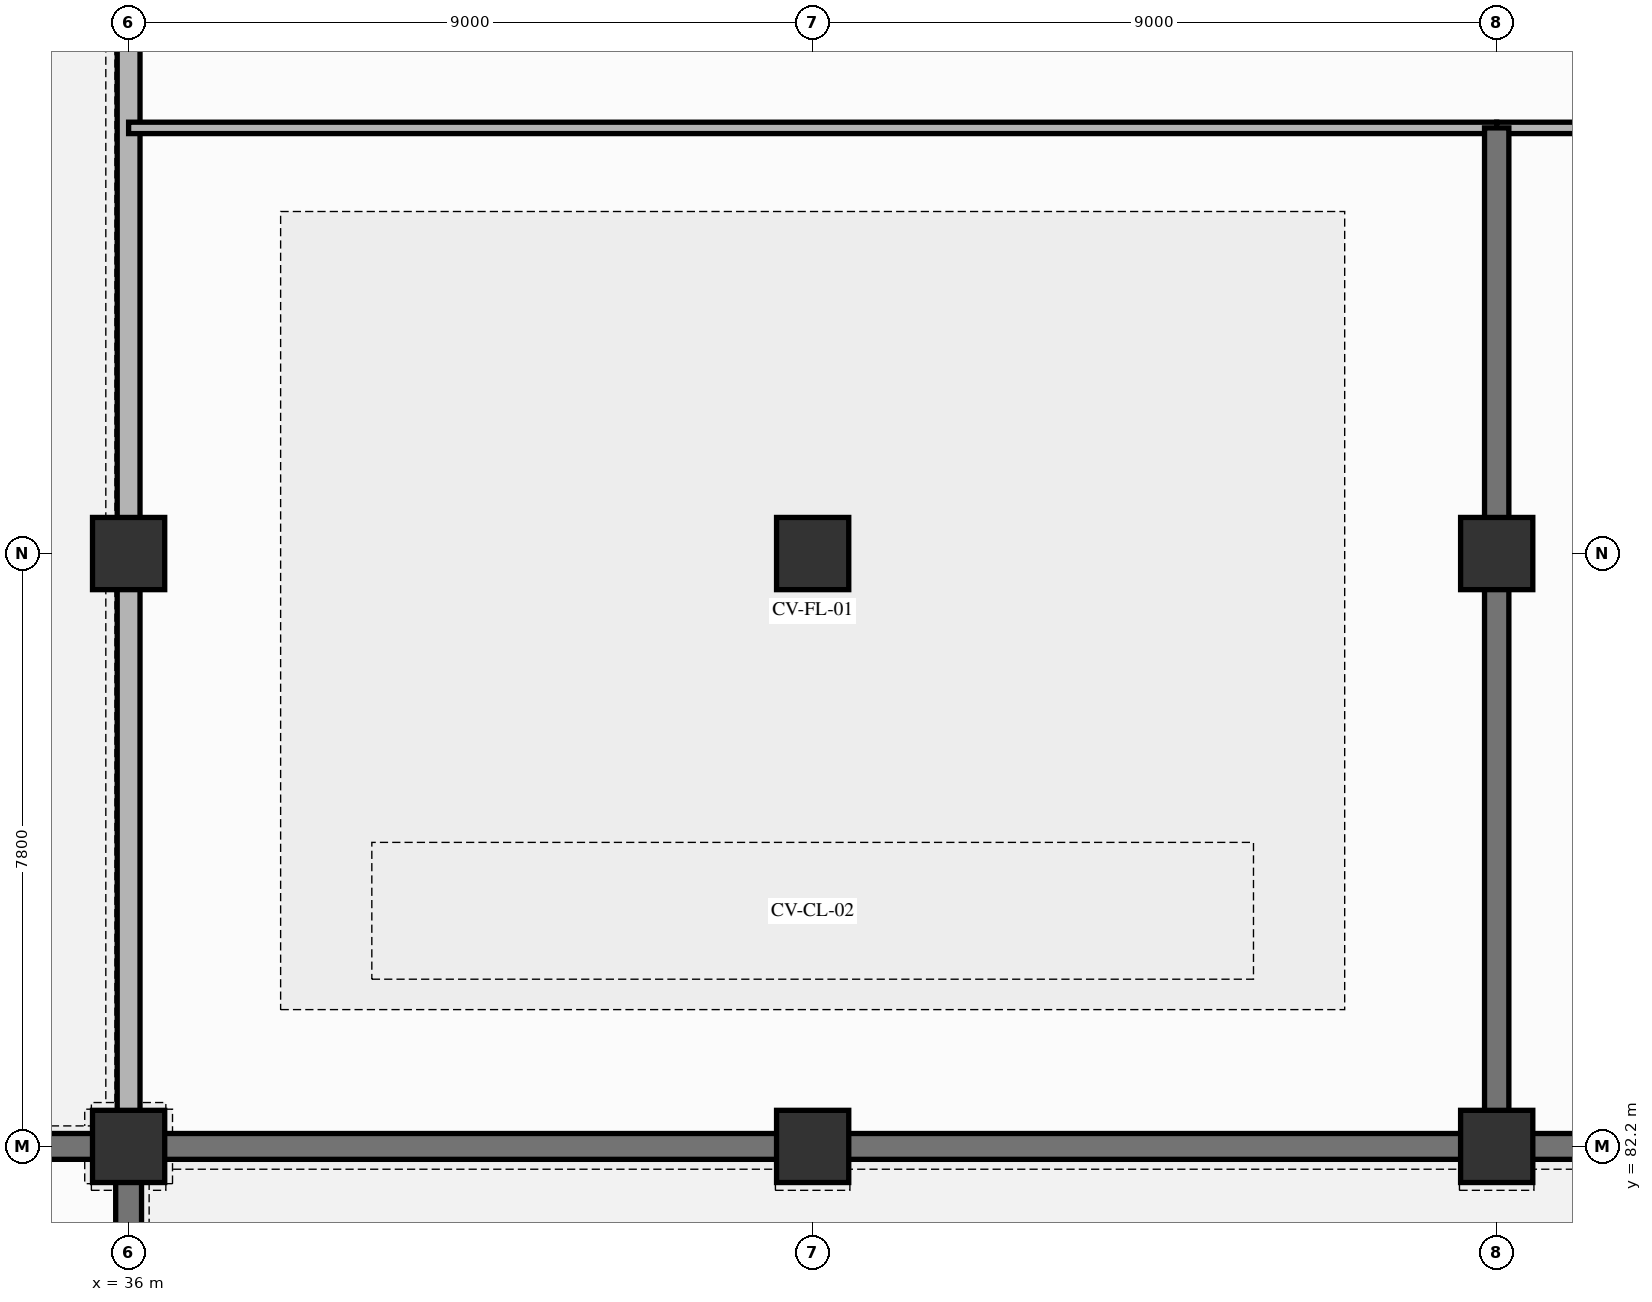
"""IFC4 building model, lengths in metres.
Left out: names, types, materials, properties, quantities, classifications, styles, units other than length and angle.
Written with IfcOpenShell. Run it as: python <this file> out.ifc"""

import sys

from ifc_helpers import new_model, si_unit, direction, frame, frame_2d, origin, origin_2d, place, context, subcontext, project, spatial, rectangle, extrude, element, fill, save


model = new_model("IFC4")
c1 = context("Model", 3, precision=1e-05, world=origin(), true_north=direction((0.0, 1.0)))
c2 = subcontext(c1, "Body", "Model", "MODEL_VIEW")
j1 = project(units=[si_unit("LENGTHUNIT", "METRE"), si_unit("PLANEANGLEUNIT", "RADIAN")], contexts=[c1])
p1 = place(None, origin())
s1 = spatial("IfcSite", under=j1, at=p1, CompositionType="ELEMENT")
p2 = place(p1, origin())
s2 = spatial("IfcBuilding", under=s1, at=p2, CompositionType="ELEMENT")
p3 = place(p2, origin())
s3 = spatial("IfcBuildingStorey", under=s2, at=p3, CompositionType="ELEMENT", Elevation=0.0)
for number, where, z_axis, x_axis in (
    (1, (36.0, 82.2, 0.0), (0.0, 0.0, 1.0), (1.0, 0.0, 0.0)),
    (2, (36.0, 90.0, 0.0), (0.0, 0.0, 1.0), (1.0, 0.0, 0.0)),
    (3, (45.0, 82.2, 0.0), (0.0, 0.0, 1.0), (1.0, 0.0, 0.0)),
    (4, (45.0, 90.0, 0.0), (0.0, 0.0, 1.0), (1.0, 0.0, 0.0)),
    (5, (54.0, 82.2, 0.0), (0.0, 0.0, 1.0), (1.0, 0.0, 0.0)),
    (6, (54.0, 90.0, 0.0), (0.0, 0.0, 1.0), (1.0, 0.0, 0.0)),
):
    element("IfcColumn", number, at=place(p3, frame(where, z_axis=z_axis, x_axis=x_axis)), inside=s3, PredefinedType="COLUMN", context=c2, shape_type="SweptSolid", body=[
        extrude(rectangle(XDim=0.95, YDim=0.95, at=origin_2d()), origin(), (0.0, 0.0, 1.0), 5.1),
    ])
p4 = place(p3, frame((36.0, 82.2, 0.0), z_axis=(0.0, 0.0, 1.0), x_axis=(1.0, 0.0, 0.0)))
e7 = element("IfcWall", 7, at=p4, inside=s3, PredefinedType="SOLIDWALL", context=c2, shape_type="SweptSolid", body=[
    extrude(rectangle(XDim=9.0, YDim=0.34, at=frame_2d((4.5, 0.0))), origin(), (0.0, 0.0, 1.0), 4.8),
])
p5 = place(p4, frame((1.8, 0.0, 0.85)))
e8 = element("IfcOpeningElement", 8, at=p5, cuts=e7, PredefinedType="OPENING", context=c2, shape_type="SweptSolid", body=[
    extrude(rectangle(XDim=1.5, YDim=2.1, at=frame_2d((0.75, 1.05))), frame((0.0, 0.18, 0.0), z_axis=(0.0, -1.0, 0.0), x_axis=(1.0, 0.0, 0.0)), (0.0, 0.0, 1.0), 0.36),
])
p6 = place(p4, frame((5.4, 0.0, 0.85)))
e9 = element("IfcOpeningElement", 9, at=p6, cuts=e7, PredefinedType="OPENING", context=c2, shape_type="SweptSolid", body=[
    extrude(rectangle(XDim=1.2, YDim=2.1, at=frame_2d((0.6, 1.05))), frame((0.0, 0.18, 0.0), z_axis=(0.0, -1.0, 0.0), x_axis=(1.0, 0.0, 0.0)), (0.0, 0.0, 1.0), 0.36),
])
p7 = place(p3, frame((45.0, 82.2, 0.0), z_axis=(0.0, 0.0, 1.0), x_axis=(1.0, 0.0, 0.0)))
e10 = element("IfcWall", 10, at=p7, inside=s3, PredefinedType="SOLIDWALL", context=c2, shape_type="SweptSolid", body=[
    extrude(rectangle(XDim=9.0, YDim=0.34, at=frame_2d((4.5, 0.0))), origin(), (0.0, 0.0, 1.0), 4.8),
])
p8 = place(p7, frame((3.6, 0.0, 0.0)))
e11 = element("IfcOpeningElement", 11, at=p8, cuts=e10, PredefinedType="OPENING", context=c2, shape_type="SweptSolid", body=[
    extrude(rectangle(XDim=1.8, YDim=2.4, at=frame_2d((0.9, 1.2))), frame((0.0, 0.18, 0.0), z_axis=(0.0, -1.0, 0.0), x_axis=(1.0, 0.0, 0.0)), (0.0, 0.0, 1.0), 0.36),
])
p9 = place(p3, frame((54.0, 82.2, 0.0), z_axis=(0.0, 0.0, 1.0), x_axis=(1.0, 0.0, 0.0)))
e12 = element("IfcWall", 12, at=p9, inside=s3, PredefinedType="SOLIDWALL", context=c2, shape_type="SweptSolid", body=[
    extrude(rectangle(XDim=9.0, YDim=0.34, at=frame_2d((4.5, 0.0))), origin(), (0.0, 0.0, 1.0), 4.8),
])
p10 = place(p9, frame((1.8, 0.0, 0.85)))
e13 = element("IfcOpeningElement", 13, at=p10, cuts=e12, PredefinedType="OPENING", context=c2, shape_type="SweptSolid", body=[
    extrude(rectangle(XDim=1.5, YDim=2.1, at=frame_2d((0.75, 1.05))), frame((0.0, 0.18, 0.0), z_axis=(0.0, -1.0, 0.0), x_axis=(1.0, 0.0, 0.0)), (0.0, 0.0, 1.0), 0.36),
])
p11 = place(p9, frame((5.4, 0.0, 0.85)))
e14 = element("IfcOpeningElement", 14, at=p11, cuts=e12, PredefinedType="OPENING", context=c2, shape_type="SweptSolid", body=[
    extrude(rectangle(XDim=1.2, YDim=2.1, at=frame_2d((0.6, 1.05))), frame((0.0, 0.18, 0.0), z_axis=(0.0, -1.0, 0.0), x_axis=(1.0, 0.0, 0.0)), (0.0, 0.0, 1.0), 0.36),
])
p12 = place(p3, frame((36.0, 82.2, 0.0), z_axis=(0.0, 0.0, 1.0), x_axis=(0.0, 1.0, 0.0)))
e15 = element("IfcWall", 15, at=p12, inside=s3, PredefinedType="SOLIDWALL", context=c2, shape_type="SweptSolid", body=[
    extrude(rectangle(XDim=31.8, YDim=0.3, at=frame_2d((15.9, 0.0))), origin(), (0.0, 0.0, 1.0), 4.095),
])
p13 = place(p12, frame((3.0, 0.0, 0.95)))
e16 = element("IfcOpeningElement", 16, at=p13, cuts=e15, PredefinedType="OPENING", context=c2, shape_type="SweptSolid", body=[
    extrude(rectangle(XDim=1.35, YDim=1.85, at=frame_2d((0.675, 0.925))), frame((0.0, 0.16, 0.0), z_axis=(0.0, -1.0, 0.0), x_axis=(1.0, 0.0, 0.0)), (0.0, 0.0, 1.0), 0.32),
])
p14 = place(p12, frame((9.5, 0.0, 0.95)))
e17 = element("IfcOpeningElement", 17, at=p14, cuts=e15, PredefinedType="OPENING", context=c2, shape_type="SweptSolid", body=[
    extrude(rectangle(XDim=1.05, YDim=1.75, at=frame_2d((0.525, 0.875))), frame((0.0, 0.16, 0.0), z_axis=(0.0, -1.0, 0.0), x_axis=(1.0, 0.0, 0.0)), (0.0, 0.0, 1.0), 0.32),
])
p15 = place(p12, frame((16.5, 0.0, 0.95)))
e18 = element("IfcOpeningElement", 18, at=p15, cuts=e15, PredefinedType="OPENING", context=c2, shape_type="SweptSolid", body=[
    extrude(rectangle(XDim=1.5, YDim=2.1, at=frame_2d((0.75, 1.05))), frame((0.0, 0.16, 0.0), z_axis=(0.0, -1.0, 0.0), x_axis=(1.0, 0.0, 0.0)), (0.0, 0.0, 1.0), 0.32),
])
p16 = place(p3, frame((36.0, 74.4, 0.0), z_axis=(0.0, 0.0, 1.0), x_axis=(0.0, 1.0, 0.0)))
e19 = element("IfcWall", 19, at=p16, inside=s3, PredefinedType="SOLIDWALL", context=c2, shape_type="SweptSolid", body=[
    extrude(rectangle(XDim=7.8, YDim=0.34, at=frame_2d((3.9, 0.0))), origin(), (0.0, 0.0, 1.0), 4.8),
])
p17 = place(p16, frame((2.8, 0.0, 0.0)))
e20 = element("IfcOpeningElement", 20, at=p17, cuts=e19, PredefinedType="OPENING", context=c2, shape_type="SweptSolid", body=[
    extrude(rectangle(XDim=1.8, YDim=2.6, at=frame_2d((0.9, 1.3))), frame((0.0, 0.18, 0.0), z_axis=(0.0, -1.0, 0.0), x_axis=(1.0, 0.0, 0.0)), (0.0, 0.0, 1.0), 0.36),
])
p18 = place(p3, frame((28.8, 82.2, 0.0), z_axis=(0.0, 0.0, 1.0), x_axis=(1.0, 0.0, 0.0)))
e21 = element("IfcWall", 21, at=p18, inside=s3, PredefinedType="SOLIDWALL", context=c2, shape_type="SweptSolid", body=[
    extrude(rectangle(XDim=7.2, YDim=0.34, at=frame_2d((3.6, 0.0))), origin(), (0.0, 0.0, 1.0), 4.8),
])
p19 = place(p18, frame((2.2, 0.0, 0.9)))
e22 = element("IfcOpeningElement", 22, at=p19, cuts=e21, PredefinedType="OPENING", context=c2, shape_type="SweptSolid", body=[
    extrude(rectangle(XDim=1.75, YDim=2.15, at=frame_2d((0.875, 1.075))), frame((0.0, 0.18, 0.0), z_axis=(0.0, -1.0, 0.0), x_axis=(1.0, 0.0, 0.0)), (0.0, 0.0, 1.0), 0.36),
])
p20 = place(p3, frame((36.0, 95.6, 0.0), z_axis=(0.0, 0.0, 1.0), x_axis=(1.0, 0.0, 0.0)))
e23 = element("IfcWall", 23, at=p20, inside=s3, PredefinedType="PARTITIONING", context=c2, shape_type="SweptSolid", body=[
    extrude(rectangle(XDim=18.0, YDim=0.15, at=frame_2d((9.0, 0.0))), origin(), (0.0, 0.0, 1.0), 3.995),
])
p21 = place(p20, frame((8.2, 0.0, 0.0)))
e24 = element("IfcOpeningElement", 24, at=p21, cuts=e23, PredefinedType="OPENING", context=c2, shape_type="SweptSolid", body=[
    extrude(rectangle(XDim=1.6, YDim=2.2, at=frame_2d((0.8, 1.1))), frame((0.0, 0.085, 0.0), z_axis=(0.0, -1.0, 0.0), x_axis=(1.0, 0.0, 0.0)), (0.0, 0.0, 1.0), 0.17),
])
p22 = place(p3, frame((54.0, 95.6, 0.0), z_axis=(0.0, 0.0, 1.0), x_axis=(1.0, 0.0, 0.0)))
e25 = element("IfcWall", 25, at=p22, inside=s3, PredefinedType="PARTITIONING", context=c2, shape_type="SweptSolid", body=[
    extrude(rectangle(XDim=18.0, YDim=0.15, at=frame_2d((9.0, 0.0))), origin(), (0.0, 0.0, 1.0), 3.995),
])
p23 = place(p22, frame((8.2, 0.0, 0.0)))
e26 = element("IfcOpeningElement", 26, at=p23, cuts=e25, PredefinedType="OPENING", context=c2, shape_type="SweptSolid", body=[
    extrude(rectangle(XDim=1.6, YDim=2.2, at=frame_2d((0.8, 1.1))), frame((0.0, 0.085, 0.0), z_axis=(0.0, -1.0, 0.0), x_axis=(1.0, 0.0, 0.0)), (0.0, 0.0, 1.0), 0.17),
])
p24 = place(p3, frame((54.0, 82.2, 0.0), z_axis=(0.0, 0.0, 1.0), x_axis=(0.0, 1.0, 0.0)))
e27 = element("IfcWall", 27, at=p24, inside=s3, PredefinedType="SHEAR", context=c2, shape_type="SweptSolid", body=[
    extrude(rectangle(XDim=13.4, YDim=0.32, at=frame_2d((6.7, 0.0))), origin(), (0.0, 0.0, 1.0), 4.8),
])
p25 = place(p5, origin())
e28 = element("IfcWindow", 28, at=p25, inside=s3, PartitioningType="SINGLE_PANEL", PredefinedType="WINDOW", context=c2, shape_type="SweptSolid", body=[
    extrude(rectangle(XDim=1.5, YDim=2.1, at=frame_2d((0.75, 1.05))), frame((0.0, 0.03, 0.0), z_axis=(0.0, -1.0, 0.0), x_axis=(1.0, 0.0, 0.0)), (0.0, 0.0, 1.0), 0.06),
])
fill(e8, e28)
p26 = place(p6, origin())
e29 = element("IfcWindow", 29, at=p26, inside=s3, PartitioningType="SINGLE_PANEL", PredefinedType="WINDOW", context=c2, shape_type="SweptSolid", body=[
    extrude(rectangle(XDim=1.2, YDim=2.1, at=frame_2d((0.6, 1.05))), frame((0.0, 0.03, 0.0), z_axis=(0.0, -1.0, 0.0), x_axis=(1.0, 0.0, 0.0)), (0.0, 0.0, 1.0), 0.06),
])
fill(e9, e29)
p27 = place(p8, frame((1.8, 0.0, 0.0), z_axis=(0.0, 0.0, 1.0), x_axis=(-1.0, 0.0, 0.0)))
e30 = element("IfcDoor", 30, at=p27, inside=s3, OperationType="DOUBLE_DOOR_SINGLE_SWING", PredefinedType="DOOR", context=c2, shape_type="SweptSolid", body=[
    extrude(rectangle(XDim=1.8, YDim=2.4, at=frame_2d((0.9, 1.2))), frame((0.0, 0.025, 0.0), z_axis=(0.0, -1.0, 0.0), x_axis=(1.0, 0.0, 0.0)), (0.0, 0.0, 1.0), 0.05),
])
fill(e11, e30)
p28 = place(p13, origin())
e31 = element("IfcWindow", 31, at=p28, inside=s3, PartitioningType="SINGLE_PANEL", PredefinedType="WINDOW", context=c2, shape_type="SweptSolid", body=[
    extrude(rectangle(XDim=1.35, YDim=1.85, at=frame_2d((0.675, 0.925))), frame((0.0, 0.03, 0.0), z_axis=(0.0, -1.0, 0.0), x_axis=(1.0, 0.0, 0.0)), (0.0, 0.0, 1.0), 0.06),
])
fill(e16, e31)
p29 = place(p14, origin())
e32 = element("IfcWindow", 32, at=p29, inside=s3, PartitioningType="SINGLE_PANEL", PredefinedType="WINDOW", context=c2, shape_type="SweptSolid", body=[
    extrude(rectangle(XDim=1.05, YDim=1.75, at=frame_2d((0.525, 0.875))), frame((0.0, 0.03, 0.0), z_axis=(0.0, -1.0, 0.0), x_axis=(1.0, 0.0, 0.0)), (0.0, 0.0, 1.0), 0.06),
])
fill(e17, e32)
p30 = place(p21, origin())
e33 = element("IfcDoor", 33, at=p30, inside=s3, OperationType="DOUBLE_DOOR_SINGLE_SWING", PredefinedType="DOOR", context=c2, shape_type="SweptSolid", body=[
    extrude(rectangle(XDim=1.6, YDim=2.2, at=frame_2d((0.8, 1.1))), frame((0.0, 0.025, 0.0), z_axis=(0.0, -1.0, 0.0), x_axis=(1.0, 0.0, 0.0)), (0.0, 0.0, 1.0), 0.05),
])
fill(e24, e33)
save(model, sys.argv[1])
